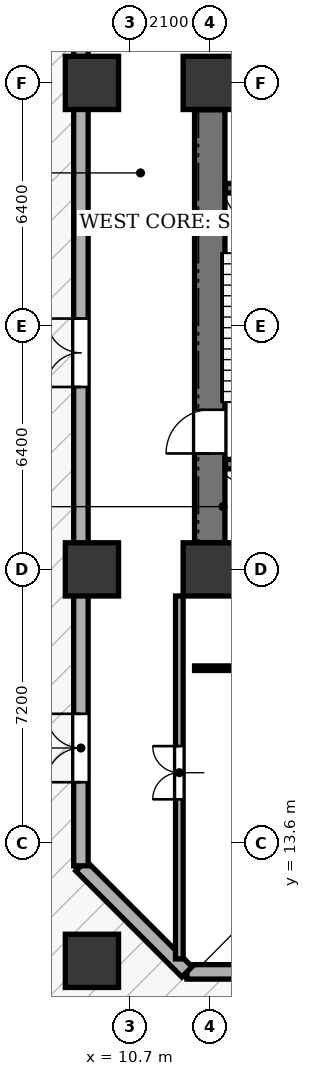
"""IFC4 building model, lengths in metres.
Left out: names, types, materials, properties, quantities, classifications, styles, units other than length and angle.
Written with IfcOpenShell. Run it as: python <this file> out.ifc"""

import sys

from ifc_helpers import new_model, si_unit, direction, frame, frame_2d, origin, origin_2d, place, context, subcontext, project, spatial, rectangle, extrude, element, fill, save


model = new_model("IFC4")
c1 = context("Model", 3, precision=1e-05, world=origin(), true_north=direction((0.0, 1.0)))
c2 = subcontext(c1, "Body", "Model", "MODEL_VIEW")
j1 = project(units=[si_unit("LENGTHUNIT", "METRE"), si_unit("PLANEANGLEUNIT", "RADIAN")], contexts=[c1])
p1 = place(None, origin())
s1 = spatial("IfcSite", under=j1, at=p1, CompositionType="ELEMENT")
p2 = place(p1, origin())
s2 = spatial("IfcBuilding", under=s1, at=p2, CompositionType="ELEMENT")
p3 = place(p2, origin())
s3 = spatial("IfcBuildingStorey", under=s2, at=p3, CompositionType="ELEMENT", Elevation=0.0)
for number, where, z_axis, x_axis in (
    (1, (12.8, 20.8, 0.0), (0.0, 0.0, 1.0), (1.0, 0.0, 0.0)),
    (2, (12.8, 33.6, 0.0), (0.0, 0.0, 1.0), (1.0, 0.0, 0.0)),
    (3, (9.7, 10.5, 0.0), (0.0, 0.0, 1.0), (1.0, 0.0, 0.0)),
    (4, (9.7, 20.8, 0.0), (0.0, 0.0, 1.0), (1.0, 0.0, 0.0)),
    (5, (9.7, 33.6, 0.0), (0.0, 0.0, 1.0), (1.0, 0.0, 0.0)),
):
    element("IfcColumn", number, at=place(p3, frame(where, z_axis=z_axis, x_axis=x_axis)), inside=s3, PredefinedType="COLUMN", context=c2, shape_type="SweptSolid", body=[
        extrude(rectangle(XDim=1.4, YDim=1.4, at=origin_2d()), origin(), (0.0, 0.0, 1.0), 5.4),
    ])
p4 = place(p3, frame((46.3, 10.21, 0.0), z_axis=(0.0, 0.0, 1.0), x_axis=(-1.0, 0.0, 0.0)))
e6 = element("IfcWall", 6, at=p4, inside=s3, PredefinedType="STANDARD", context=c2, shape_type="SweptSolid", body=[
    extrude(rectangle(XDim=34.1, YDim=0.38, at=frame_2d((17.05, 0.0))), origin(), (0.0, 0.0, 1.0), 3.135),
])
p5 = place(p4, frame((13.8, 0.0, 0.0)))
e7 = element("IfcOpeningElement", 7, at=p5, cuts=e6, PredefinedType="OPENING", context=c2, shape_type="SweptSolid", body=[
    extrude(rectangle(XDim=2.0, YDim=2.3, at=frame_2d((1.0, 1.15))), frame((0.0, 0.2, 0.0), z_axis=(0.0, -1.0, 0.0), x_axis=(1.0, 0.0, 0.0)), (0.0, 0.0, 1.0), 0.4),
])
p6 = place(p4, frame((20.6, 0.0, 0.0)))
e8 = element("IfcOpeningElement", 8, at=p6, cuts=e6, PredefinedType="OPENING", context=c2, shape_type="SweptSolid", body=[
    extrude(rectangle(XDim=1.8, YDim=2.3, at=frame_2d((0.9, 1.15))), frame((0.0, 0.2, 0.0), z_axis=(0.0, -1.0, 0.0), x_axis=(1.0, 0.0, 0.0)), (0.0, 0.0, 1.0), 0.4),
])
p7 = place(p4, frame((22.8, 0.0, 0.0)))
e9 = element("IfcOpeningElement", 9, at=p7, cuts=e6, PredefinedType="OPENING", context=c2, shape_type="SweptSolid", body=[
    extrude(rectangle(XDim=2.0, YDim=2.3, at=frame_2d((1.0, 1.15))), frame((0.0, 0.2, 0.0), z_axis=(0.0, -1.0, 0.0), x_axis=(1.0, 0.0, 0.0)), (0.0, 0.0, 1.0), 0.4),
])
p8 = place(p4, frame((28.8, 0.0, 0.0)))
e10 = element("IfcOpeningElement", 10, at=p8, cuts=e6, PredefinedType="OPENING", context=c2, shape_type="SweptSolid", body=[
    extrude(rectangle(XDim=2.0, YDim=2.3, at=frame_2d((1.0, 1.15))), frame((0.0, 0.2, 0.0), z_axis=(0.0, -1.0, 0.0), x_axis=(1.0, 0.0, 0.0)), (0.0, 0.0, 1.0), 0.4),
])
p9 = place(p3, frame((12.2, 10.21, 0.0), z_axis=(0.0, 0.0, 1.0), x_axis=(-0.707106781187, 0.707106781187, 0.0)))
e11 = element("IfcWall", 11, at=p9, inside=s3, PredefinedType="STANDARD", context=c2, shape_type="SweptSolid", body=[
    extrude(rectangle(XDim=3.946, YDim=0.38, at=frame_2d((1.973, 0.0))), origin(), (0.0, 0.0, 1.0), 4.95),
])
p10 = place(p3, frame((9.41, 13.0, 0.0), z_axis=(0.0, 0.0, 1.0), x_axis=(0.0, 1.0, 0.0)))
e12 = element("IfcWall", 12, at=p10, inside=s3, PredefinedType="STANDARD", context=c2, shape_type="SweptSolid", body=[
    extrude(rectangle(XDim=28.4, YDim=0.38, at=frame_2d((14.2, 0.0))), origin(), (0.0, 0.0, 1.0), 3.135),
])
p11 = place(p10, frame((2.2, 0.0, 0.0)))
e13 = element("IfcOpeningElement", 13, at=p11, cuts=e12, PredefinedType="OPENING", context=c2, shape_type="SweptSolid", body=[
    extrude(rectangle(XDim=1.8, YDim=2.3, at=frame_2d((0.9, 1.15))), frame((0.0, 0.2, 0.0), z_axis=(0.0, -1.0, 0.0), x_axis=(1.0, 0.0, 0.0)), (0.0, 0.0, 1.0), 0.4),
])
p12 = place(p10, frame((12.6, 0.0, 0.0)))
e14 = element("IfcOpeningElement", 14, at=p12, cuts=e12, PredefinedType="OPENING", context=c2, shape_type="SweptSolid", body=[
    extrude(rectangle(XDim=1.8, YDim=2.3, at=frame_2d((0.9, 1.15))), frame((0.0, 0.2, 0.0), z_axis=(0.0, -1.0, 0.0), x_axis=(1.0, 0.0, 0.0)), (0.0, 0.0, 1.0), 0.4),
])
p13 = place(p3, frame((12.8, 21.505, 0.0), z_axis=(0.0, 0.0, 1.0), x_axis=(0.0, 1.0, 0.0)))
e15 = element("IfcWall", 15, at=p13, inside=s3, PredefinedType="SHEAR", context=c2, shape_type="SweptSolid", body=[
    extrude(rectangle(XDim=11.39, YDim=0.8, at=frame_2d((5.695, 0.0))), origin(), (0.0, 0.0, 1.0), 4.95),
])
p14 = place(p13, frame((2.345, 0.0, 0.0)))
e16 = element("IfcOpeningElement", 16, at=p14, cuts=e15, PredefinedType="OPENING", context=c2, shape_type="SweptSolid", body=[
    extrude(rectangle(XDim=1.15, YDim=2.15, at=frame_2d((0.575, 1.075))), frame((0.0, 0.41, 0.0), z_axis=(0.0, -1.0, 0.0), x_axis=(1.0, 0.0, 0.0)), (0.0, 0.0, 1.0), 0.82),
])
for number, where, z_axis, x_axis in (
    (17, (13.21, 23.57, 0.0), (0.0, 0.0, 1.0), (1.0, 0.0, 0.0)),
    (18, (13.21, 30.83, 0.0), (0.0, 0.0, 1.0), (1.0, 0.0, 0.0)),
):
    element("IfcWall", number, at=place(p3, frame(where, z_axis=z_axis, x_axis=x_axis)), inside=s3, PredefinedType="SHEAR", context=c2, shape_type="SweptSolid", body=[
        extrude(rectangle(XDim=3.1, YDim=0.25, at=frame_2d((1.55, 0.0))), origin(), (0.0, 0.0, 1.0), 4.95),
    ])
p15 = place(p3, frame((12.0, 10.55, 0.0), z_axis=(0.0, 0.0, 1.0), x_axis=(0.0, 1.0, 0.0)))
e19 = element("IfcWall", 19, at=p15, inside=s3, PredefinedType="SOLIDWALL", context=c2, shape_type="SweptSolid", body=[
    extrude(rectangle(XDim=9.55, YDim=0.2, at=frame_2d((4.775, 0.0))), origin(), (0.0, 0.0, 1.0), 4.95),
])
p16 = place(p15, frame((4.2, 0.0, 0.0)))
e20 = element("IfcOpeningElement", 20, at=p16, cuts=e19, PredefinedType="OPENING", context=c2, shape_type="SweptSolid", body=[
    extrude(rectangle(XDim=1.4, YDim=2.15, at=frame_2d((0.7, 1.075))), frame((0.0, 0.11, 0.0), z_axis=(0.0, -1.0, 0.0), x_axis=(1.0, 0.0, 0.0)), (0.0, 0.0, 1.0), 0.22),
])
p17 = place(p3, frame((12.4, 18.2, 0.0), z_axis=(0.0, 0.0, 1.0), x_axis=(1.0, 0.0, 0.0)))
e21 = element("IfcWall", 21, at=p17, inside=s3, PredefinedType="PARTITIONING", context=c2, shape_type="SweptSolid", body=[
    extrude(rectangle(XDim=9.4, YDim=0.12, at=frame_2d((4.7, 0.0))), origin(), (0.0, 0.0, 1.0), 4.95),
])
p18 = place(p17, frame((4.0, 0.0, 0.0)))
e22 = element("IfcOpeningElement", 22, at=p18, cuts=e21, PredefinedType="OPENING", context=c2, shape_type="SweptSolid", body=[
    extrude(rectangle(XDim=1.4, YDim=2.15, at=frame_2d((0.7, 1.075))), frame((0.0, 0.07, 0.0), z_axis=(0.0, -1.0, 0.0), x_axis=(1.0, 0.0, 0.0)), (0.0, 0.0, 1.0), 0.14),
])
p19 = place(p11, origin())
e23 = element("IfcDoor", 23, at=p19, inside=s3, OperationType="DOUBLE_DOOR_SINGLE_SWING", PredefinedType="DOOR", context=c2, shape_type="SweptSolid", body=[
    extrude(rectangle(XDim=1.8, YDim=2.3, at=frame_2d((0.9, 1.15))), frame((0.0, 0.025, 0.0), z_axis=(0.0, -1.0, 0.0), x_axis=(1.0, 0.0, 0.0)), (0.0, 0.0, 1.0), 0.05),
])
fill(e13, e23)
p20 = place(p12, origin())
e24 = element("IfcDoor", 24, at=p20, inside=s3, OperationType="DOUBLE_DOOR_SINGLE_SWING", PredefinedType="DOOR", context=c2, shape_type="SweptSolid", body=[
    extrude(rectangle(XDim=1.8, YDim=2.3, at=frame_2d((0.9, 1.15))), frame((0.0, 0.025, 0.0), z_axis=(0.0, -1.0, 0.0), x_axis=(1.0, 0.0, 0.0)), (0.0, 0.0, 1.0), 0.05),
])
fill(e14, e24)
p21 = place(p14, origin())
e25 = element("IfcDoor", 25, at=p21, inside=s3, OperationType="SINGLE_SWING_LEFT", PredefinedType="DOOR", context=c2, shape_type="SweptSolid", body=[
    extrude(rectangle(XDim=1.15, YDim=2.15, at=frame_2d((0.575, 1.075))), frame((0.0, 0.025, 0.0), z_axis=(0.0, -1.0, 0.0), x_axis=(1.0, 0.0, 0.0)), (0.0, 0.0, 1.0), 0.05),
])
fill(e16, e25)
p22 = place(p16, origin())
e26 = element("IfcDoor", 26, at=p22, inside=s3, OperationType="DOUBLE_DOOR_SINGLE_SWING", PredefinedType="DOOR", context=c2, shape_type="SweptSolid", body=[
    extrude(rectangle(XDim=1.4, YDim=2.15, at=frame_2d((0.7, 1.075))), frame((0.0, 0.025, 0.0), z_axis=(0.0, -1.0, 0.0), x_axis=(1.0, 0.0, 0.0)), (0.0, 0.0, 1.0), 0.05),
])
fill(e20, e26)
save(model, sys.argv[1])
